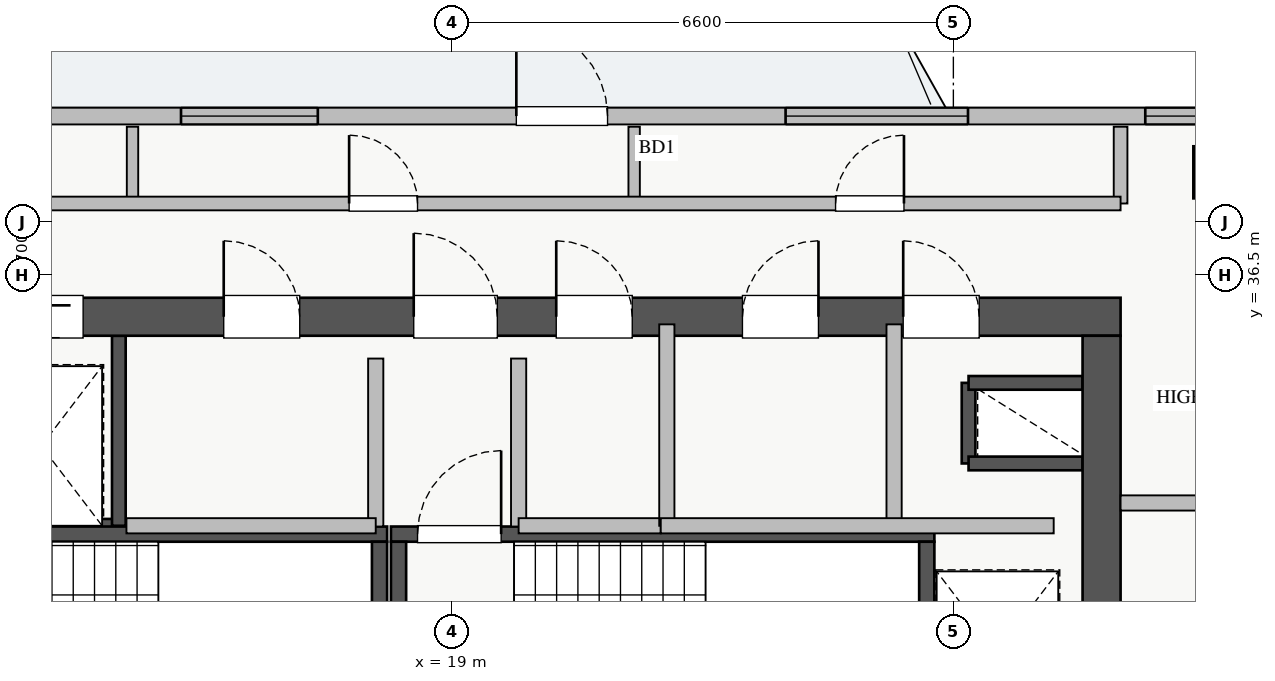
"""IFC4 building model, lengths in metres.
Left out: names, types, materials, properties, quantities, classifications, styles, units other than length and angle.
Written with IfcOpenShell. Run it as: python <this file> out.ifc"""

import sys

from ifc_helpers import new_model, si_unit, direction, frame, frame_2d, origin, origin_2d, place, context, subcontext, project, spatial, rectangle, extrude, source, transform, mapped, element, fill, save


model = new_model("IFC4")
c1 = context("Model", 3, precision=1e-05, world=origin(), true_north=direction((0.0, 1.0)))
c2 = subcontext(c1, "Body", "Model", "MODEL_VIEW")
j1 = project(units=[si_unit("LENGTHUNIT", "METRE"), si_unit("PLANEANGLEUNIT", "RADIAN")], contexts=[c1])
p1 = place(None, origin())
s1 = spatial("IfcSite", under=j1, at=p1, CompositionType="ELEMENT")
p2 = place(p1, origin())
s2 = spatial("IfcBuilding", under=s1, at=p2, CompositionType="ELEMENT")
p3 = place(p2, frame((0.0, 0.0, 256.75)))
s3 = spatial("IfcBuildingStorey", under=s2, at=p3, CompositionType="ELEMENT", Elevation=256.75)
p4 = place(p3, frame((12.68, 33.2, 0.0), z_axis=(0.0, 0.0, 1.0), x_axis=(1.0, 0.0, 0.0)))
e1 = element("IfcWall", 1, at=p4, inside=s3, PredefinedType="SHEAR", context=c2, shape_type="SweptSolid", body=[
    extrude(rectangle(XDim=1.94, YDim=0.18, at=frame_2d((0.97, 0.0))), origin(), (0.0, 0.0, 1.0), 3.07),
])
p5 = place(p3, frame((14.62, 33.2, 0.0), z_axis=(0.0, 0.0, 1.0), x_axis=(0.0, 1.0, 0.0)))
e2 = element("IfcWall", 2, at=p5, inside=s3, PredefinedType="SHEAR", context=c2, shape_type="SweptSolid", body=[
    extrude(rectangle(XDim=2.5, YDim=0.18, at=frame_2d((1.25, 0.0))), origin(), (0.0, 0.0, 1.0), 3.07),
])
p6 = place(p3, frame((25.8, 34.02, 0.0), z_axis=(0.0, 0.0, 1.0), x_axis=(0.0, 1.0, 0.0)))
e3 = element("IfcWall", 3, at=p6, inside=s3, PredefinedType="SHEAR", context=c2, shape_type="SweptSolid", body=[
    extrude(rectangle(XDim=1.06, YDim=0.18, at=frame_2d((0.53, 0.0))), origin(), (0.0, 0.0, 1.0), 3.07),
])
for number, where, z_axis, x_axis in (
    (4, (25.8, 35.08, 0.0), (0.0, 0.0, 1.0), (1.0, 0.0, 0.0)),
    (5, (25.8, 34.02, 0.0), (0.0, 0.0, 1.0), (1.0, 0.0, 0.0)),
):
    element("IfcWall", number, at=place(p3, frame(where, z_axis=z_axis, x_axis=x_axis)), inside=s3, PredefinedType="SHEAR", context=c2, shape_type="SweptSolid", body=[
        extrude(rectangle(XDim=1.5, YDim=0.18, at=frame_2d((0.75, 0.0))), origin(), (0.0, 0.0, 1.0), 3.07),
    ])
p7 = place(p3, frame((10.7, 33.09, 0.0), z_axis=(0.0, 0.0, 1.0), x_axis=(1.0, 0.0, 0.0)))
e6 = element("IfcWall", 6, at=p7, inside=s3, PredefinedType="SHEAR", context=c2, shape_type="SweptSolid", body=[
    extrude(rectangle(XDim=7.45, YDim=0.2, at=frame_2d((3.725, 0.0))), origin(), (0.0, 0.0, 1.0), 3.25),
])
p8 = place(p7, frame((0.35, 0.0, 0.0)))
e7 = element("IfcOpeningElement", 7, at=p8, cuts=e6, PredefinedType="OPENING", context=c2, shape_type="SweptSolid", body=[
    extrude(rectangle(XDim=1.1, YDim=2.05, at=frame_2d((0.55, 1.025))), frame((0.0, 0.11, 0.0), z_axis=(0.0, -1.0, 0.0), x_axis=(1.0, 0.0, 0.0)), (0.0, 0.0, 1.0), 0.22),
])
p9 = place(p3, frame((18.05, 30.05, 0.0), z_axis=(0.0, 0.0, 1.0), x_axis=(0.0, 1.0, 0.0)))
e8 = element("IfcWall", 8, at=p9, inside=s3, PredefinedType="SHEAR", context=c2, shape_type="SweptSolid", body=[
    extrude(rectangle(XDim=2.94, YDim=0.2, at=frame_2d((1.47, 0.0))), origin(), (0.0, 0.0, 1.0), 3.25),
])
p10 = place(p3, frame((18.2, 33.09, 0.0), z_axis=(0.0, 0.0, 1.0), x_axis=(1.0, 0.0, 0.0)))
e9 = element("IfcWall", 9, at=p10, inside=s3, PredefinedType="SHEAR", context=c2, shape_type="SweptSolid", body=[
    extrude(rectangle(XDim=7.15, YDim=0.2, at=frame_2d((3.575, 0.0))), origin(), (0.0, 0.0, 1.0), 3.25),
])
p11 = place(p10, frame((0.35, 0.0, 0.0)))
e10 = element("IfcOpeningElement", 10, at=p11, cuts=e9, PredefinedType="OPENING", context=c2, shape_type="SweptSolid", body=[
    extrude(rectangle(XDim=1.1, YDim=2.05, at=frame_2d((0.55, 1.025))), frame((0.0, 0.11, 0.0), z_axis=(0.0, -1.0, 0.0), x_axis=(1.0, 0.0, 0.0)), (0.0, 0.0, 1.0), 0.22),
])
for number, where, z_axis, x_axis in (
    (11, (18.3, 30.05, 0.0), (0.0, 0.0, 1.0), (0.0, 1.0, 0.0)),
    (12, (25.25, 30.05, 0.0), (0.0, 0.0, 1.0), (0.0, 1.0, 0.0)),
):
    element("IfcWall", number, at=place(p3, frame(where, z_axis=z_axis, x_axis=x_axis)), inside=s3, PredefinedType="SHEAR", context=c2, shape_type="SweptSolid", body=[
        extrude(rectangle(XDim=2.94, YDim=0.2, at=frame_2d((1.47, 0.0))), origin(), (0.0, 0.0, 1.0), 3.25),
    ])
p12 = place(p3, frame((10.2, 35.95, 0.0), z_axis=(0.0, 0.0, 1.0), x_axis=(1.0, 0.0, 0.0)))
e13 = element("IfcWall", 13, at=p12, inside=s3, PredefinedType="SHEAR", context=c2, shape_type="SweptSolid", body=[
    extrude(rectangle(XDim=17.6, YDim=0.5, at=frame_2d((8.8, 0.0))), origin(), (0.0, 0.0, 1.0), 3.25),
])
p13 = place(p12, frame((1.15, 0.0, 0.0)))
e14 = element("IfcOpeningElement", 14, at=p13, cuts=e13, PredefinedType="OPENING", context=c2, shape_type="SweptSolid", body=[
    extrude(rectangle(XDim=1.1, YDim=2.05, at=frame_2d((0.55, 1.025))), frame((0.0, 0.26, 0.0), z_axis=(0.0, -1.0, 0.0), x_axis=(1.0, 0.0, 0.0)), (0.0, 0.0, 1.0), 0.52),
])
p14 = place(p12, frame((8.3, 0.0, 0.0)))
e15 = element("IfcOpeningElement", 15, at=p14, cuts=e13, PredefinedType="OPENING", context=c2, shape_type="SweptSolid", body=[
    extrude(rectangle(XDim=1.1, YDim=2.05, at=frame_2d((0.55, 1.025))), frame((0.0, 0.26, 0.0), z_axis=(0.0, -1.0, 0.0), x_axis=(1.0, 0.0, 0.0)), (0.0, 0.0, 1.0), 0.52),
])
p15 = place(p12, frame((2.85, 0.0, 0.0)))
e16 = element("IfcOpeningElement", 16, at=p15, cuts=e13, PredefinedType="OPENING", context=c2, shape_type="SweptSolid", body=[
    extrude(rectangle(XDim=1.1, YDim=2.05, at=frame_2d((0.55, 1.025))), frame((0.0, 0.26, 0.0), z_axis=(0.0, -1.0, 0.0), x_axis=(1.0, 0.0, 0.0)), (0.0, 0.0, 1.0), 0.52),
])
p16 = place(p12, frame((5.8, 0.0, 0.0)))
e17 = element("IfcOpeningElement", 17, at=p16, cuts=e13, PredefinedType="OPENING", context=c2, shape_type="SweptSolid", body=[
    extrude(rectangle(XDim=1.0, YDim=2.05, at=frame_2d((0.5, 1.025))), frame((0.0, 0.26, 0.0), z_axis=(0.0, -1.0, 0.0), x_axis=(1.0, 0.0, 0.0)), (0.0, 0.0, 1.0), 0.52),
])
p17 = place(p12, frame((14.74, 0.0, 0.0)))
e18 = element("IfcOpeningElement", 18, at=p17, cuts=e13, PredefinedType="OPENING", context=c2, shape_type="SweptSolid", body=[
    extrude(rectangle(XDim=1.0, YDim=2.05, at=frame_2d((0.5, 1.025))), frame((0.0, 0.26, 0.0), z_axis=(0.0, -1.0, 0.0), x_axis=(1.0, 0.0, 0.0)), (0.0, 0.0, 1.0), 0.52),
])
p18 = place(p12, frame((10.175, 0.0, 0.0)))
e19 = element("IfcOpeningElement", 19, at=p18, cuts=e13, PredefinedType="OPENING", context=c2, shape_type="SweptSolid", body=[
    extrude(rectangle(XDim=1.0, YDim=2.05, at=frame_2d((0.5, 1.025))), frame((0.0, 0.26, 0.0), z_axis=(0.0, -1.0, 0.0), x_axis=(1.0, 0.0, 0.0)), (0.0, 0.0, 1.0), 0.52),
])
p19 = place(p12, frame((12.625, 0.0, 0.0)))
e20 = element("IfcOpeningElement", 20, at=p19, cuts=e13, PredefinedType="OPENING", context=c2, shape_type="SweptSolid", body=[
    extrude(rectangle(XDim=1.0, YDim=2.05, at=frame_2d((0.5, 1.025))), frame((0.0, 0.26, 0.0), z_axis=(0.0, -1.0, 0.0), x_axis=(1.0, 0.0, 0.0)), (0.0, 0.0, 1.0), 0.52),
])
p20 = place(p3, frame((27.55, 29.5, 0.0), z_axis=(0.0, 0.0, 1.0), x_axis=(0.0, 1.0, 0.0)))
e21 = element("IfcWall", 21, at=p20, inside=s3, PredefinedType="SHEAR", context=c2, shape_type="SweptSolid", body=[
    extrude(rectangle(XDim=6.2, YDim=0.5, at=frame_2d((3.1, 0.0))), origin(), (0.0, 0.0, 1.0), 3.25),
])
p21 = place(p20, frame((1.1, 0.0, 0.0)))
e22 = element("IfcOpeningElement", 22, at=p21, cuts=e21, PredefinedType="OPENING", context=c2, shape_type="SweptSolid", body=[
    extrude(rectangle(XDim=1.3, YDim=2.05, at=frame_2d((0.65, 1.025))), frame((0.0, 0.26, 0.0), z_axis=(0.0, -1.0, 0.0), x_axis=(1.0, 0.0, 0.0)), (0.0, 0.0, 1.0), 0.52),
])
m1 = source(origin(), c2, "Body", "SweptSolid", [
    extrude(rectangle(XDim=0.65, YDim=0.65, at=origin_2d()), origin(), (0.0, 0.0, 1.0), 3.25),
])
p22 = place(p3, frame((29.1, 37.85, 0.0), z_axis=(0.0, 0.0, 1.0), x_axis=(1.0, 0.0, 0.0)))
e23 = element("IfcColumn", 23, at=p22, inside=s3, PredefinedType="COLUMN", context=c2, shape_type="MappedRepresentation", body=[
    mapped(m1, transform((0.0, 0.0, 0.0), x_axis=(1.0, 0.0, 0.0), y_axis=(0.0, 1.0, 0.0), z_axis=(0.0, 0.0, 1.0), scale=1.0)),
])
p23 = place(p3, frame((8.35, 38.59, 0.0), z_axis=(0.0, 0.0, 1.0), x_axis=(1.0, 0.0, 0.0)))
e24 = element("IfcWall", 24, at=p23, inside=s3, PredefinedType="STANDARD", context=c2, shape_type="SweptSolid", body=[
    extrude(rectangle(XDim=21.3, YDim=0.22, at=frame_2d((10.65, 0.0))), origin(), (0.0, 0.0, 1.0), 2.61),
])
p24 = place(p23, frame((11.5, 0.0, 0.0)))
e25 = element("IfcOpeningElement", 25, at=p24, cuts=e24, PredefinedType="OPENING", context=c2, shape_type="SweptSolid", body=[
    extrude(rectangle(XDim=1.2, YDim=2.1, at=frame_2d((0.6, 1.05))), frame((0.0, 0.12, 0.0), z_axis=(0.0, -1.0, 0.0), x_axis=(1.0, 0.0, 0.0)), (0.0, 0.0, 1.0), 0.24),
])
p25 = place(p23, frame((1.463, 0.0, 0.9)))
e26 = element("IfcOpeningElement", 26, at=p25, cuts=e24, PredefinedType="OPENING", context=c2, shape_type="SweptSolid", body=[
    extrude(rectangle(XDim=2.4, YDim=1.48, at=frame_2d((1.2, 0.74))), frame((0.0, 0.12, 0.0), z_axis=(0.0, -1.0, 0.0), x_axis=(1.0, 0.0, 0.0)), (0.0, 0.0, 1.0), 0.24),
])
p26 = place(p23, frame((7.088, 0.0, 0.9)))
e27 = element("IfcOpeningElement", 27, at=p26, cuts=e24, PredefinedType="OPENING", context=c2, shape_type="SweptSolid", body=[
    extrude(rectangle(XDim=1.8, YDim=1.45, at=frame_2d((0.9, 0.725))), frame((0.0, 0.12, 0.0), z_axis=(0.0, -1.0, 0.0), x_axis=(1.0, 0.0, 0.0)), (0.0, 0.0, 1.0), 0.24),
])
p27 = place(p23, frame((19.775, 0.0, 0.9)))
e28 = element("IfcOpeningElement", 28, at=p27, cuts=e24, PredefinedType="OPENING", context=c2, shape_type="SweptSolid", body=[
    extrude(rectangle(XDim=1.2, YDim=1.4, at=frame_2d((0.6, 0.7))), frame((0.0, 0.12, 0.0), z_axis=(0.0, -1.0, 0.0), x_axis=(1.0, 0.0, 0.0)), (0.0, 0.0, 1.0), 0.24),
])
p28 = place(p23, frame((15.042, 0.0, 0.9)))
e29 = element("IfcOpeningElement", 29, at=p28, cuts=e24, PredefinedType="OPENING", context=c2, shape_type="SweptSolid", body=[
    extrude(rectangle(XDim=2.4, YDim=1.5, at=frame_2d((1.2, 0.75))), frame((0.0, 0.12, 0.0), z_axis=(0.0, -1.0, 0.0), x_axis=(1.0, 0.0, 0.0)), (0.0, 0.0, 1.0), 0.24),
])
p29 = place(p3, frame((27.8, 33.5, 0.0), z_axis=(0.0, 0.0, 1.0), x_axis=(1.0, 0.0, 0.0)))
e30 = element("IfcWall", 30, at=p29, inside=s3, PredefinedType="PARTITIONING", context=c2, shape_type="SweptSolid", body=[
    extrude(rectangle(XDim=3.1, YDim=0.2, at=frame_2d((1.55, 0.0))), origin(), (0.0, 0.0, 1.0), 3.07),
])
for number, where, z_axis, x_axis in (
    (31, (18.0, 33.19, 0.0), (0.0, 0.0, 1.0), (0.0, 1.0, 0.0)),
    (32, (19.88, 33.19, 0.0), (0.0, 0.0, 1.0), (0.0, 1.0, 0.0)),
):
    element("IfcWall", number, at=place(p3, frame(where, z_axis=z_axis, x_axis=x_axis)), inside=s3, PredefinedType="PARTITIONING", context=c2, shape_type="SweptSolid", body=[
        extrude(rectangle(XDim=2.21, YDim=0.2, at=frame_2d((1.105, 0.0))), origin(), (0.0, 0.0, 1.0), 3.07),
    ])
p30 = place(p3, frame((14.72, 33.2, 0.0), z_axis=(0.0, 0.0, 1.0), x_axis=(1.0, 0.0, 0.0)))
e33 = element("IfcWall", 33, at=p30, inside=s3, PredefinedType="PARTITIONING", context=c2, shape_type="SweptSolid", body=[
    extrude(rectangle(XDim=3.28, YDim=0.2, at=frame_2d((1.64, 0.0))), origin(), (0.0, 0.0, 1.0), 3.07),
])
p31 = place(p3, frame((24.82, 33.2, 0.0), z_axis=(0.0, 0.0, 1.0), x_axis=(0.0, 1.0, 0.0)))
e34 = element("IfcWall", 34, at=p31, inside=s3, PredefinedType="PARTITIONING", context=c2, shape_type="SweptSolid", body=[
    extrude(rectangle(XDim=2.65, YDim=0.2, at=frame_2d((1.325, 0.0))), origin(), (0.0, 0.0, 1.0), 3.07),
])
p32 = place(p3, frame((19.88, 33.2, 0.0), z_axis=(0.0, 0.0, 1.0), x_axis=(1.0, 0.0, 0.0)))
e35 = element("IfcWall", 35, at=p32, inside=s3, PredefinedType="PARTITIONING", context=c2, shape_type="SweptSolid", body=[
    extrude(rectangle(XDim=1.87, YDim=0.2, at=frame_2d((0.935, 0.0))), origin(), (0.0, 0.0, 1.0), 3.07),
])
p33 = place(p3, frame((21.83, 33.2, 0.0), z_axis=(0.0, 0.0, 1.0), x_axis=(0.0, 1.0, 0.0)))
e36 = element("IfcWall", 36, at=p33, inside=s3, PredefinedType="PARTITIONING", context=c2, shape_type="SweptSolid", body=[
    extrude(rectangle(XDim=2.65, YDim=0.2, at=frame_2d((1.325, 0.0))), origin(), (0.0, 0.0, 1.0), 3.07),
])
p34 = place(p3, frame((21.75, 33.2, 0.0), z_axis=(0.0, 0.0, 1.0), x_axis=(1.0, 0.0, 0.0)))
e37 = element("IfcWall", 37, at=p34, inside=s3, PredefinedType="PARTITIONING", context=c2, shape_type="SweptSolid", body=[
    extrude(rectangle(XDim=5.17, YDim=0.2, at=frame_2d((2.585, 0.0))), origin(), (0.0, 0.0, 1.0), 3.07),
])
p35 = place(p3, frame((27.8, 37.44, 0.0), z_axis=(0.0, 0.0, 1.0), x_axis=(0.0, 1.0, 0.0)))
e38 = element("IfcWall", 38, at=p35, inside=s3, PredefinedType="PARTITIONING", context=c2, shape_type="SweptSolid", body=[
    extrude(rectangle(XDim=1.01, YDim=0.18, at=frame_2d((0.505, 0.0))), origin(), (0.0, 0.0, 1.0), 3.07),
])
for number, where, z_axis, x_axis in (
    (39, (14.8, 37.44, 0.0), (0.0, 0.0, 1.0), (0.0, 1.0, 0.0)),
    (40, (21.4, 37.44, 0.0), (0.0, 0.0, 1.0), (0.0, 1.0, 0.0)),
):
    element("IfcWall", number, at=place(p3, frame(where, z_axis=z_axis, x_axis=x_axis)), inside=s3, PredefinedType="PARTITIONING", context=c2, shape_type="SweptSolid", body=[
        extrude(rectangle(XDim=1.01, YDim=0.15, at=frame_2d((0.505, 0.0))), origin(), (0.0, 0.0, 1.0), 3.07),
    ])
p36 = place(p3, frame((8.85, 37.44, 0.0), z_axis=(0.0, 0.0, 1.0), x_axis=(1.0, 0.0, 0.0)))
e41 = element("IfcWall", 41, at=p36, inside=s3, PredefinedType="PARTITIONING", context=c2, shape_type="SweptSolid", body=[
    extrude(rectangle(XDim=18.95, YDim=0.18, at=frame_2d((9.475, 0.0))), origin(), (0.0, 0.0, 1.0), 3.07),
])
p37 = place(p36, frame((2.8, 0.0, 0.0)))
e42 = element("IfcOpeningElement", 42, at=p37, cuts=e41, PredefinedType="OPENING", context=c2, shape_type="SweptSolid", body=[
    extrude(rectangle(XDim=0.9, YDim=2.05, at=frame_2d((0.45, 1.025))), frame((0.0, 0.1, 0.0), z_axis=(0.0, -1.0, 0.0), x_axis=(1.0, 0.0, 0.0)), (0.0, 0.0, 1.0), 0.2),
])
p38 = place(p36, frame((8.8, 0.0, 0.0)))
e43 = element("IfcOpeningElement", 43, at=p38, cuts=e41, PredefinedType="OPENING", context=c2, shape_type="SweptSolid", body=[
    extrude(rectangle(XDim=0.9, YDim=2.05, at=frame_2d((0.45, 1.025))), frame((0.0, 0.1, 0.0), z_axis=(0.0, -1.0, 0.0), x_axis=(1.0, 0.0, 0.0)), (0.0, 0.0, 1.0), 0.2),
])
p39 = place(p36, frame((15.2, 0.0, 0.0)))
e44 = element("IfcOpeningElement", 44, at=p39, cuts=e41, PredefinedType="OPENING", context=c2, shape_type="SweptSolid", body=[
    extrude(rectangle(XDim=0.9, YDim=2.05, at=frame_2d((0.45, 1.025))), frame((0.0, 0.1, 0.0), z_axis=(0.0, -1.0, 0.0), x_axis=(1.0, 0.0, 0.0)), (0.0, 0.0, 1.0), 0.2),
])
m2 = source(origin(), c2, "Body", "SweptSolid", [
    extrude(rectangle(XDim=1.2, YDim=2.1, at=frame_2d((0.6, 1.05))), frame((0.0, 0.025, 0.0), z_axis=(0.0, -1.0, 0.0), x_axis=(1.0, 0.0, 0.0)), (0.0, 0.0, 1.0), 0.05),
])
p40 = place(p24, origin())
e45 = element("IfcDoor", 45, at=p40, inside=s3, OperationType="SINGLE_SWING_LEFT", PredefinedType="DOOR", context=c2, shape_type="MappedRepresentation", body=[
    mapped(m2, transform((0.0, 0.0, 0.0), x_axis=(1.0, 0.0, 0.0), y_axis=(0.0, 1.0, 0.0), z_axis=(0.0, 0.0, 1.0), scale=1.0)),
])
fill(e25, e45)
m3 = source(origin(), c2, "Body", "SweptSolid", [
    extrude(rectangle(XDim=1.8, YDim=1.45, at=frame_2d((0.9, 0.725))), frame((0.0, 0.03, 0.0), z_axis=(0.0, -1.0, 0.0), x_axis=(1.0, 0.0, 0.0)), (0.0, 0.0, 1.0), 0.06),
])
p41 = place(p26, origin())
e46 = element("IfcWindow", 46, at=p41, inside=s3, PartitioningType="DOUBLE_PANEL_VERTICAL", PredefinedType="WINDOW", context=c2, shape_type="MappedRepresentation", body=[
    mapped(m3, transform((0.0, 0.0, 0.0), x_axis=(1.0, 0.0, 0.0), y_axis=(0.0, 1.0, 0.0), z_axis=(0.0, 0.0, 1.0), scale=1.0)),
])
fill(e27, e46)
m4 = source(origin(), c2, "Body", "SweptSolid", [
    extrude(rectangle(XDim=1.2, YDim=1.4, at=frame_2d((0.6, 0.7))), frame((0.0, 0.03, 0.0), z_axis=(0.0, -1.0, 0.0), x_axis=(1.0, 0.0, 0.0)), (0.0, 0.0, 1.0), 0.06),
])
p42 = place(p27, origin())
e47 = element("IfcWindow", 47, at=p42, inside=s3, PartitioningType="TRIPLE_PANEL_VERTICAL", PredefinedType="WINDOW", context=c2, shape_type="MappedRepresentation", body=[
    mapped(m4, transform((0.0, 0.0, 0.0), x_axis=(1.0, 0.0, 0.0), y_axis=(0.0, 1.0, 0.0), z_axis=(0.0, 0.0, 1.0), scale=1.0)),
])
fill(e28, e47)
m5 = source(origin(), c2, "Body", "SweptSolid", [
    extrude(rectangle(XDim=1.1, YDim=2.05, at=frame_2d((0.55, 1.025))), frame((0.0, 0.025, 0.0), z_axis=(0.0, -1.0, 0.0), x_axis=(1.0, 0.0, 0.0)), (0.0, 0.0, 1.0), 0.05),
])
p43 = place(p14, origin())
e48 = element("IfcDoor", 48, at=p43, inside=s3, OperationType="SINGLE_SWING_LEFT", PredefinedType="DOOR", context=c2, shape_type="MappedRepresentation", body=[
    mapped(m5, transform((0.0, 0.0, 0.0), x_axis=(1.0, 0.0, 0.0), y_axis=(0.0, 1.0, 0.0), z_axis=(0.0, 0.0, 1.0), scale=1.0)),
])
fill(e15, e48)
p44 = place(p11, origin())
e49 = element("IfcDoor", 49, at=p44, inside=s3, OperationType="SINGLE_SWING_RIGHT", PredefinedType="DOOR", context=c2, shape_type="MappedRepresentation", body=[
    mapped(m5, transform((0.0, 0.0, 0.0), x_axis=(1.0, 0.0, 0.0), y_axis=(0.0, 1.0, 0.0), z_axis=(0.0, 0.0, 1.0), scale=1.0)),
])
fill(e10, e49)
p45 = place(p15, origin())
e50 = element("IfcDoor", 50, at=p45, inside=s3, OperationType="SLIDING_TO_LEFT", PredefinedType="DOOR", context=c2, shape_type="MappedRepresentation", body=[
    mapped(m5, transform((0.0, 0.0, 0.0), x_axis=(1.0, 0.0, 0.0), y_axis=(0.0, 1.0, 0.0), z_axis=(0.0, 0.0, 1.0), scale=1.0)),
])
fill(e16, e50)
m6 = source(origin(), c2, "Body", "SweptSolid", [
    extrude(rectangle(XDim=1.0, YDim=2.05, at=frame_2d((0.5, 1.025))), frame((0.0, 0.025, 0.0), z_axis=(0.0, -1.0, 0.0), x_axis=(1.0, 0.0, 0.0)), (0.0, 0.0, 1.0), 0.05),
])
p46 = place(p16, origin())
e51 = element("IfcDoor", 51, at=p46, inside=s3, OperationType="SINGLE_SWING_LEFT", PredefinedType="DOOR", context=c2, shape_type="MappedRepresentation", body=[
    mapped(m6, transform((0.0, 0.0, 0.0), x_axis=(1.0, 0.0, 0.0), y_axis=(0.0, 1.0, 0.0), z_axis=(0.0, 0.0, 1.0), scale=1.0)),
])
fill(e17, e51)
p47 = place(p17, origin())
e52 = element("IfcDoor", 52, at=p47, inside=s3, OperationType="SINGLE_SWING_LEFT", PredefinedType="DOOR", context=c2, shape_type="MappedRepresentation", body=[
    mapped(m6, transform((0.0, 0.0, 0.0), x_axis=(1.0, 0.0, 0.0), y_axis=(0.0, 1.0, 0.0), z_axis=(0.0, 0.0, 1.0), scale=1.0)),
])
fill(e18, e52)
p48 = place(p18, origin())
e53 = element("IfcDoor", 53, at=p48, inside=s3, OperationType="SINGLE_SWING_LEFT", PredefinedType="DOOR", context=c2, shape_type="MappedRepresentation", body=[
    mapped(m6, transform((0.0, 0.0, 0.0), x_axis=(1.0, 0.0, 0.0), y_axis=(0.0, 1.0, 0.0), z_axis=(0.0, 0.0, 1.0), scale=1.0)),
])
fill(e19, e53)
p49 = place(p19, origin())
e54 = element("IfcDoor", 54, at=p49, inside=s3, OperationType="SINGLE_SWING_RIGHT", PredefinedType="DOOR", context=c2, shape_type="MappedRepresentation", body=[
    mapped(m6, transform((0.0, 0.0, 0.0), x_axis=(1.0, 0.0, 0.0), y_axis=(0.0, 1.0, 0.0), z_axis=(0.0, 0.0, 1.0), scale=1.0)),
])
fill(e20, e54)
m7 = source(origin(), c2, "Body", "SweptSolid", [
    extrude(rectangle(XDim=0.9, YDim=2.05, at=frame_2d((0.45, 1.025))), frame((0.0, 0.025, 0.0), z_axis=(0.0, -1.0, 0.0), x_axis=(1.0, 0.0, 0.0)), (0.0, 0.0, 1.0), 0.05),
])
p50 = place(p38, origin())
e55 = element("IfcDoor", 55, at=p50, inside=s3, OperationType="SINGLE_SWING_LEFT", PredefinedType="DOOR", context=c2, shape_type="MappedRepresentation", body=[
    mapped(m7, transform((0.0, 0.0, 0.0), x_axis=(1.0, 0.0, 0.0), y_axis=(0.0, 1.0, 0.0), z_axis=(0.0, 0.0, 1.0), scale=1.0)),
])
fill(e43, e55)
p51 = place(p39, origin())
e56 = element("IfcDoor", 56, at=p51, inside=s3, OperationType="SINGLE_SWING_RIGHT", PredefinedType="DOOR", context=c2, shape_type="MappedRepresentation", body=[
    mapped(m7, transform((0.0, 0.0, 0.0), x_axis=(1.0, 0.0, 0.0), y_axis=(0.0, 1.0, 0.0), z_axis=(0.0, 0.0, 1.0), scale=1.0)),
])
fill(e44, e56)
m8 = source(origin(), c2, "Body", "SweptSolid", [
    extrude(rectangle(XDim=2.4, YDim=1.5, at=frame_2d((1.2, 0.75))), frame((0.0, 0.03, 0.0), z_axis=(0.0, -1.0, 0.0), x_axis=(1.0, 0.0, 0.0)), (0.0, 0.0, 1.0), 0.06),
])
p52 = place(p28, origin())
e57 = element("IfcWindow", 57, at=p52, inside=s3, PartitioningType="TRIPLE_PANEL_VERTICAL", PredefinedType="WINDOW", context=c2, shape_type="MappedRepresentation", body=[
    mapped(m8, transform((0.0, 0.0, 0.0), x_axis=(1.0, 0.0, 0.0), y_axis=(0.0, 1.0, 0.0), z_axis=(0.0, 0.0, 1.0), scale=1.0)),
])
fill(e29, e57)
save(model, sys.argv[1])
